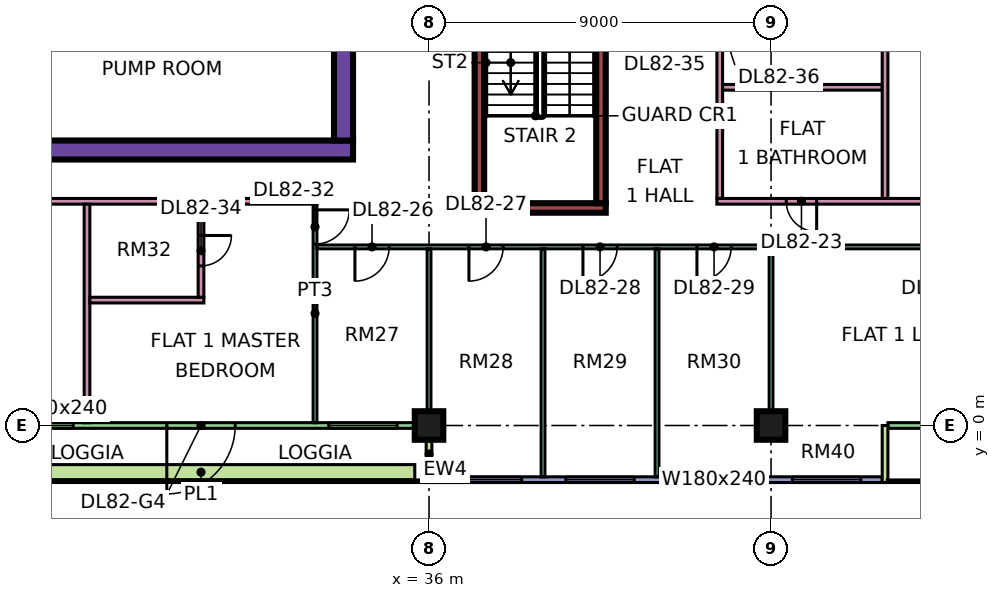
"""IFC4 building model, lengths in metres.
Left out: names, types, materials, properties, quantities, classifications, styles, units other than length and angle.
Written with IfcOpenShell. Run it as: python <this file> out.ifc"""

import sys

from ifc_helpers import new_model, si_unit, direction, frame, frame_2d, origin, origin_2d, place, context, subcontext, project, spatial, rectangle, extrude, element, fill, save


model = new_model("IFC4")
c1 = context("Model", 3, precision=1e-05, world=origin(), true_north=direction((0.0, 1.0)))
c2 = subcontext(c1, "Body", "Model", "MODEL_VIEW")
j1 = project(units=[si_unit("LENGTHUNIT", "METRE"), si_unit("PLANEANGLEUNIT", "RADIAN")], contexts=[c1])
p1 = place(None, origin())
s1 = spatial("IfcSite", under=j1, at=p1, CompositionType="ELEMENT")
p2 = place(p1, origin())
s2 = spatial("IfcBuilding", under=s1, at=p2, CompositionType="ELEMENT")
p3 = place(p2, frame((0.0, 0.0, 353.9)))
s3 = spatial("IfcBuildingStorey", under=s2, at=p3, CompositionType="ELEMENT", Elevation=353.9)
for number, where, z_axis, x_axis in (
    (1, (36.0, 0.0, 0.0), (0.0, 0.0, 1.0), (1.0, 0.0, 0.0)),
    (2, (45.0, 0.0, 0.0), (0.0, 0.0, 1.0), (1.0, 0.0, 0.0)),
):
    element("IfcColumn", number, at=place(p3, frame(where, z_axis=z_axis, x_axis=x_axis)), inside=s3, PredefinedType="COLUMN", context=c2, shape_type="SweptSolid", body=[
        extrude(rectangle(XDim=0.75, YDim=0.75, at=origin_2d()), origin(), (0.0, 0.0, 1.0), 3.75),
    ])
p4 = place(p3, frame((9.0, 7.25, 0.0), z_axis=(0.0, 0.0, 1.0), x_axis=(1.0, 0.0, 0.0)))
e3 = element("IfcWall", 3, at=p4, inside=s3, PredefinedType="SHEAR", context=c2, shape_type="SweptSolid", body=[
    extrude(rectangle(XDim=25.0, YDim=0.5, at=frame_2d((12.5, 0.0))), origin(), (0.0, 0.0, 1.0), 3.75),
])
p5 = place(p3, frame((33.75, 7.5, 0.0), z_axis=(0.0, 0.0, 1.0), x_axis=(0.0, 1.0, 0.0)))
e4 = element("IfcWall", 4, at=p5, inside=s3, PredefinedType="SHEAR", context=c2, shape_type="SweptSolid", body=[
    extrude(rectangle(XDim=12.0, YDim=0.5, at=frame_2d((6.0, 0.0))), origin(), (0.0, 0.0, 1.0), 3.75),
])
p6 = place(p5, frame((5.7, 0.0, 0.0)))
e5 = element("IfcOpeningElement", 5, at=p6, cuts=e4, PredefinedType="OPENING", context=c2, shape_type="SweptSolid", body=[
    extrude(rectangle(XDim=1.8, YDim=2.4, at=frame_2d((0.9, 1.2))), frame((0.0, 0.26, 0.0), z_axis=(0.0, -1.0, 0.0), x_axis=(1.0, 0.0, 0.0)), (0.0, 0.0, 1.0), 0.52),
])
p7 = place(p3, frame((37.2, 5.725, 0.0), z_axis=(0.0, 0.0, 1.0), x_axis=(1.0, 0.0, 0.0)))
e6 = element("IfcWall", 6, at=p7, inside=s3, PredefinedType="SHEAR", context=c2, shape_type="SweptSolid", body=[
    extrude(rectangle(XDim=3.45, YDim=0.25, at=frame_2d((1.725, 0.0))), origin(), (0.0, 0.0, 1.0), 3.75),
])
for number, where, z_axis, x_axis in (
    (7, (37.325, 5.85, 0.0), (0.0, 0.0, 1.0), (0.0, 1.0, 0.0)),
    (8, (40.525, 5.85, 0.0), (0.0, 0.0, 1.0), (0.0, 1.0, 0.0)),
):
    element("IfcWall", number, at=place(p3, frame(where, z_axis=z_axis, x_axis=x_axis)), inside=s3, PredefinedType="SHEAR", context=c2, shape_type="SweptSolid", body=[
        extrude(rectangle(XDim=6.5, YDim=0.25, at=frame_2d((3.25, 0.0))), origin(), (0.0, 0.0, 1.0), 3.75),
    ])
p8 = place(p3, frame((24.075, 0.0, 0.0), z_axis=(0.0, 0.0, 1.0), x_axis=(1.0, 0.0, 0.0)))
e9 = element("IfcWall", 9, at=p8, inside=s3, PredefinedType="SOLIDWALL", context=c2, shape_type="SweptSolid", body=[
    extrude(rectangle(XDim=11.85, YDim=0.15, at=frame_2d((5.925, 0.0))), origin(), (0.0, 0.0, 1.0), 3.35),
])
p9 = place(p8, frame((0.762, 0.0, 0.45)))
e10 = element("IfcOpeningElement", 10, at=p9, cuts=e9, PredefinedType="OPENING", context=c2, shape_type="SweptSolid", body=[
    extrude(rectangle(XDim=1.8, YDim=2.4, at=frame_2d((0.9, 1.2))), frame((0.0, 0.085, 0.0), z_axis=(0.0, -1.0, 0.0), x_axis=(1.0, 0.0, 0.0)), (0.0, 0.0, 1.0), 0.17),
])
p10 = place(p8, frame((5.025, 0.0, 0.0)))
e11 = element("IfcOpeningElement", 11, at=p10, cuts=e9, PredefinedType="OPENING", context=c2, shape_type="SweptSolid", body=[
    extrude(rectangle(XDim=1.8, YDim=2.4, at=frame_2d((0.9, 1.2))), frame((0.0, 0.085, 0.0), z_axis=(0.0, -1.0, 0.0), x_axis=(1.0, 0.0, 0.0)), (0.0, 0.0, 1.0), 0.17),
])
p11 = place(p8, frame((9.288, 0.0, 0.45)))
e12 = element("IfcOpeningElement", 12, at=p11, cuts=e9, PredefinedType="OPENING", context=c2, shape_type="SweptSolid", body=[
    extrude(rectangle(XDim=1.8, YDim=2.4, at=frame_2d((0.9, 1.2))), frame((0.0, 0.085, 0.0), z_axis=(0.0, -1.0, 0.0), x_axis=(1.0, 0.0, 0.0)), (0.0, 0.0, 1.0), 0.17),
])
p12 = place(p3, frame((36.0, -1.5, 0.0), z_axis=(0.0, 0.0, 1.0), x_axis=(0.0, 1.0, 0.0)))
e13 = element("IfcWall", 13, at=p12, inside=s3, PredefinedType="SOLIDWALL", context=c2, shape_type="SweptSolid", body=[
    extrude(rectangle(XDim=1.5, YDim=0.15, at=frame_2d((0.75, 0.0))), origin(), (0.0, 0.0, 1.0), 3.35),
])
p13 = place(p3, frame((36.075, -1.425, 0.0), z_axis=(0.0, 0.0, 1.0), x_axis=(1.0, 0.0, 0.0)))
e14 = element("IfcWall", 14, at=p13, inside=s3, PredefinedType="SOLIDWALL", context=c2, shape_type="SweptSolid", body=[
    extrude(rectangle(XDim=11.85, YDim=0.15, at=frame_2d((5.925, 0.0))), origin(), (0.0, 0.0, 1.0), 3.35),
])
p14 = place(p13, frame((0.562, 0.0, 0.45)))
e15 = element("IfcOpeningElement", 15, at=p14, cuts=e14, PredefinedType="OPENING", context=c2, shape_type="SweptSolid", body=[
    extrude(rectangle(XDim=1.8, YDim=2.4, at=frame_2d((0.9, 1.2))), frame((0.0, 0.085, 0.0), z_axis=(0.0, -1.0, 0.0), x_axis=(1.0, 0.0, 0.0)), (0.0, 0.0, 1.0), 0.17),
])
p15 = place(p13, frame((3.525, 0.0, 0.45)))
e16 = element("IfcOpeningElement", 16, at=p15, cuts=e14, PredefinedType="OPENING", context=c2, shape_type="SweptSolid", body=[
    extrude(rectangle(XDim=1.8, YDim=2.4, at=frame_2d((0.9, 1.2))), frame((0.0, 0.085, 0.0), z_axis=(0.0, -1.0, 0.0), x_axis=(1.0, 0.0, 0.0)), (0.0, 0.0, 1.0), 0.17),
])
p16 = place(p13, frame((6.525, 0.0, 0.45)))
e17 = element("IfcOpeningElement", 17, at=p16, cuts=e14, PredefinedType="OPENING", context=c2, shape_type="SweptSolid", body=[
    extrude(rectangle(XDim=1.8, YDim=2.4, at=frame_2d((0.9, 1.2))), frame((0.0, 0.085, 0.0), z_axis=(0.0, -1.0, 0.0), x_axis=(1.0, 0.0, 0.0)), (0.0, 0.0, 1.0), 0.17),
])
p17 = place(p13, frame((9.488, 0.0, 0.45)))
e18 = element("IfcOpeningElement", 18, at=p17, cuts=e14, PredefinedType="OPENING", context=c2, shape_type="SweptSolid", body=[
    extrude(rectangle(XDim=1.8, YDim=2.4, at=frame_2d((0.9, 1.2))), frame((0.0, 0.085, 0.0), z_axis=(0.0, -1.0, 0.0), x_axis=(1.0, 0.0, 0.0)), (0.0, 0.0, 1.0), 0.17),
])
p18 = place(p3, frame((48.075, 0.0, 0.0), z_axis=(0.0, 0.0, 1.0), x_axis=(1.0, 0.0, 0.0)))
e19 = element("IfcWall", 19, at=p18, inside=s3, PredefinedType="SOLIDWALL", context=c2, shape_type="SweptSolid", body=[
    extrude(rectangle(XDim=4.35, YDim=0.15, at=frame_2d((2.175, 0.0))), origin(), (0.0, 0.0, 1.0), 3.35),
])
p19 = place(p18, frame((1.275, 0.0, 0.0)))
e20 = element("IfcOpeningElement", 20, at=p19, cuts=e19, PredefinedType="OPENING", context=c2, shape_type="SweptSolid", body=[
    extrude(rectangle(XDim=1.8, YDim=2.4, at=frame_2d((0.9, 1.2))), frame((0.0, 0.085, 0.0), z_axis=(0.0, -1.0, 0.0), x_axis=(1.0, 0.0, 0.0)), (0.0, 0.0, 1.0), 0.17),
])
p20 = place(p3, frame((48.0, -1.5, 0.0), z_axis=(0.0, 0.0, 1.0), x_axis=(0.0, 1.0, 0.0)))
e21 = element("IfcWall", 21, at=p20, inside=s3, PredefinedType="SOLIDWALL", context=c2, shape_type="SweptSolid", body=[
    extrude(rectangle(XDim=1.5, YDim=0.15, at=frame_2d((0.75, 0.0))), origin(), (0.0, 0.0, 1.0), 3.35),
])
p21 = place(p3, frame((24.375, -1.229, 0.0), z_axis=(0.0, 0.0, 1.0), x_axis=(1.0, 0.0, 0.0)))
e22 = element("IfcWall", 22, at=p21, inside=s3, PredefinedType="SOLIDWALL", context=c2, shape_type="SweptSolid", body=[
    extrude(rectangle(XDim=11.25, YDim=0.4, at=frame_2d((5.625, 0.0))), origin(), (0.0, 0.0, 1.0), 0.7),
])
p22 = place(p3, frame((11.95, 5.9, 0.0), z_axis=(0.0, 0.0, 1.0), x_axis=(1.0, 0.0, 0.0)))
e23 = element("IfcWall", 23, at=p22, inside=s3, PredefinedType="PARTITIONING", context=c2, shape_type="SweptSolid", body=[
    extrude(rectangle(XDim=21.1, YDim=0.15, at=frame_2d((10.55, 0.0))), origin(), (0.0, 0.0, 1.0), 3.35),
])
p23 = place(p22, frame((1.1, 0.0, 0.0)))
e24 = element("IfcOpeningElement", 24, at=p23, cuts=e23, PredefinedType="OPENING", context=c2, shape_type="SweptSolid", body=[
    extrude(rectangle(XDim=0.9, YDim=2.1, at=frame_2d((0.45, 1.05))), frame((0.0, 0.085, 0.0), z_axis=(0.0, -1.0, 0.0), x_axis=(1.0, 0.0, 0.0)), (0.0, 0.0, 1.0), 0.17),
])
p24 = place(p22, frame((4.1, 0.0, 0.0)))
e25 = element("IfcOpeningElement", 25, at=p24, cuts=e23, PredefinedType="OPENING", context=c2, shape_type="SweptSolid", body=[
    extrude(rectangle(XDim=0.9, YDim=2.1, at=frame_2d((0.45, 1.05))), frame((0.0, 0.085, 0.0), z_axis=(0.0, -1.0, 0.0), x_axis=(1.0, 0.0, 0.0)), (0.0, 0.0, 1.0), 0.17),
])
p25 = place(p22, frame((10.1, 0.0, 0.0)))
e26 = element("IfcOpeningElement", 26, at=p25, cuts=e23, PredefinedType="OPENING", context=c2, shape_type="SweptSolid", body=[
    extrude(rectangle(XDim=0.9, YDim=2.1, at=frame_2d((0.45, 1.05))), frame((0.0, 0.085, 0.0), z_axis=(0.0, -1.0, 0.0), x_axis=(1.0, 0.0, 0.0)), (0.0, 0.0, 1.0), 0.17),
])
p26 = place(p3, frame((27.0, 0.074, 0.0), z_axis=(0.0, 0.0, 1.0), x_axis=(0.0, 1.0, 0.0)))
e27 = element("IfcWall", 27, at=p26, inside=s3, PredefinedType="PARTITIONING", context=c2, shape_type="SweptSolid", body=[
    extrude(rectangle(XDim=5.751, YDim=0.15, at=frame_2d((2.875, 0.0))), origin(), (0.0, 0.0, 1.0), 3.35),
])
p27 = place(p3, frame((27.075, 3.3, 0.0), z_axis=(0.0, 0.0, 1.0), x_axis=(1.0, 0.0, 0.0)))
e28 = element("IfcWall", 28, at=p27, inside=s3, PredefinedType="PARTITIONING", context=c2, shape_type="SweptSolid", body=[
    extrude(rectangle(XDim=3.0, YDim=0.15, at=frame_2d((1.5, 0.0))), origin(), (0.0, 0.0, 1.0), 3.35),
])
p28 = place(p3, frame((30.0, 3.375, 0.0), z_axis=(0.0, 0.0, 1.0), x_axis=(0.0, 1.0, 0.0)))
e29 = element("IfcWall", 29, at=p28, inside=s3, PredefinedType="PARTITIONING", context=c2, shape_type="SweptSolid", body=[
    extrude(rectangle(XDim=2.45, YDim=0.15, at=frame_2d((1.225, 0.0))), origin(), (0.0, 0.0, 1.0), 3.35),
])
p29 = place(p28, frame((0.825, 0.0, 0.0)))
e30 = element("IfcOpeningElement", 30, at=p29, cuts=e29, PredefinedType="OPENING", context=c2, shape_type="SweptSolid", body=[
    extrude(rectangle(XDim=0.8, YDim=2.1, at=frame_2d((0.4, 1.05))), frame((0.0, 0.085, 0.0), z_axis=(0.0, -1.0, 0.0), x_axis=(1.0, 0.0, 0.0)), (0.0, 0.0, 1.0), 0.17),
])
p30 = place(p3, frame((33.0, 0.074, 0.0), z_axis=(0.0, 0.0, 1.0), x_axis=(0.0, 1.0, 0.0)))
e31 = element("IfcWall", 31, at=p30, inside=s3, PredefinedType="PARTITIONING", context=c2, shape_type="SweptSolid", body=[
    extrude(rectangle(XDim=5.751, YDim=0.1, at=frame_2d((2.875, 0.0))), origin(), (0.0, 0.0, 1.0), 3.35),
])
p31 = place(p30, frame((4.701, 0.0, 0.0)))
e32 = element("IfcOpeningElement", 32, at=p31, cuts=e31, PredefinedType="OPENING", context=c2, shape_type="SweptSolid", body=[
    extrude(rectangle(XDim=0.9, YDim=2.1, at=frame_2d((0.45, 1.05))), frame((0.0, 0.06, 0.0), z_axis=(0.0, -1.0, 0.0), x_axis=(1.0, 0.0, 0.0)), (0.0, 0.0, 1.0), 0.12),
])
p32 = place(p3, frame((33.05, 4.7, 0.0), z_axis=(0.0, 0.0, 1.0), x_axis=(1.0, 0.0, 0.0)))
e33 = element("IfcWall", 33, at=p32, inside=s3, PredefinedType="PARTITIONING", context=c2, shape_type="SweptSolid", body=[
    extrude(rectangle(XDim=20.876, YDim=0.1, at=frame_2d((10.438, 0.0))), origin(), (0.0, 0.0, 1.0), 3.35),
])
p33 = place(p32, frame((1.0, 0.0, 0.0)))
e34 = element("IfcOpeningElement", 34, at=p33, cuts=e33, PredefinedType="OPENING", context=c2, shape_type="SweptSolid", body=[
    extrude(rectangle(XDim=0.9, YDim=2.1, at=frame_2d((0.45, 1.05))), frame((0.0, 0.06, 0.0), z_axis=(0.0, -1.0, 0.0), x_axis=(1.0, 0.0, 0.0)), (0.0, 0.0, 1.0), 0.12),
])
p34 = place(p32, frame((4.0, 0.0, 0.0)))
e35 = element("IfcOpeningElement", 35, at=p34, cuts=e33, PredefinedType="OPENING", context=c2, shape_type="SweptSolid", body=[
    extrude(rectangle(XDim=0.9, YDim=2.1, at=frame_2d((0.45, 1.05))), frame((0.0, 0.06, 0.0), z_axis=(0.0, -1.0, 0.0), x_axis=(1.0, 0.0, 0.0)), (0.0, 0.0, 1.0), 0.12),
])
p35 = place(p32, frame((7.0, 0.0, 0.0)))
e36 = element("IfcOpeningElement", 36, at=p35, cuts=e33, PredefinedType="OPENING", context=c2, shape_type="SweptSolid", body=[
    extrude(rectangle(XDim=0.9, YDim=2.1, at=frame_2d((0.45, 1.05))), frame((0.0, 0.06, 0.0), z_axis=(0.0, -1.0, 0.0), x_axis=(1.0, 0.0, 0.0)), (0.0, 0.0, 1.0), 0.12),
])
p36 = place(p32, frame((10.0, 0.0, 0.0)))
e37 = element("IfcOpeningElement", 37, at=p36, cuts=e33, PredefinedType="OPENING", context=c2, shape_type="SweptSolid", body=[
    extrude(rectangle(XDim=0.9, YDim=2.1, at=frame_2d((0.45, 1.05))), frame((0.0, 0.06, 0.0), z_axis=(0.0, -1.0, 0.0), x_axis=(1.0, 0.0, 0.0)), (0.0, 0.0, 1.0), 0.12),
])
p37 = place(p32, frame((16.0, 0.0, 0.0)))
e38 = element("IfcOpeningElement", 38, at=p37, cuts=e33, PredefinedType="OPENING", context=c2, shape_type="SweptSolid", body=[
    extrude(rectangle(XDim=0.9, YDim=2.1, at=frame_2d((0.45, 1.05))), frame((0.0, 0.06, 0.0), z_axis=(0.0, -1.0, 0.0), x_axis=(1.0, 0.0, 0.0)), (0.0, 0.0, 1.0), 0.12),
])
p38 = place(p3, frame((36.0, 0.0, 0.0), z_axis=(0.0, 0.0, 1.0), x_axis=(0.0, 1.0, 0.0)))
e39 = element("IfcWall", 39, at=p38, inside=s3, PredefinedType="PARTITIONING", context=c2, shape_type="SweptSolid", body=[
    extrude(rectangle(XDim=4.65, YDim=0.1, at=frame_2d((2.325, 0.0))), origin(), (0.0, 0.0, 1.0), 3.35),
])
for number, where, z_axis, x_axis in (
    (40, (39.0, -1.351, 0.0), (0.0, 0.0, 1.0), (0.0, 1.0, 0.0)),
    (41, (42.0, -1.351, 0.0), (0.0, 0.0, 1.0), (0.0, 1.0, 0.0)),
):
    element("IfcWall", number, at=place(p3, frame(where, z_axis=z_axis, x_axis=x_axis)), inside=s3, PredefinedType="PARTITIONING", context=c2, shape_type="SweptSolid", body=[
        extrude(rectangle(XDim=6.001, YDim=0.1, at=frame_2d((3.0, 0.0))), origin(), (0.0, 0.0, 1.0), 3.35),
    ])
p39 = place(p3, frame((43.575, 5.9, 0.0), z_axis=(0.0, 0.0, 1.0), x_axis=(1.0, 0.0, 0.0)))
e42 = element("IfcWall", 42, at=p39, inside=s3, PredefinedType="PARTITIONING", context=c2, shape_type="SweptSolid", body=[
    extrude(rectangle(XDim=10.351, YDim=0.15, at=frame_2d((5.176, 0.0))), origin(), (0.0, 0.0, 1.0), 3.35),
])
p40 = place(p39, frame((1.825, 0.0, 0.0)))
e43 = element("IfcOpeningElement", 43, at=p40, cuts=e42, PredefinedType="OPENING", context=c2, shape_type="SweptSolid", body=[
    extrude(rectangle(XDim=0.8, YDim=2.1, at=frame_2d((0.4, 1.05))), frame((0.0, 0.085, 0.0), z_axis=(0.0, -1.0, 0.0), x_axis=(1.0, 0.0, 0.0)), (0.0, 0.0, 1.0), 0.17),
])
p41 = place(p39, frame((6.975, 0.0, 0.0)))
e44 = element("IfcOpeningElement", 44, at=p41, cuts=e42, PredefinedType="OPENING", context=c2, shape_type="SweptSolid", body=[
    extrude(rectangle(XDim=0.9, YDim=2.1, at=frame_2d((0.45, 1.05))), frame((0.0, 0.085, 0.0), z_axis=(0.0, -1.0, 0.0), x_axis=(1.0, 0.0, 0.0)), (0.0, 0.0, 1.0), 0.17),
])
p42 = place(p3, frame((43.65, 5.975, 0.0), z_axis=(0.0, 0.0, 1.0), x_axis=(0.0, 1.0, 0.0)))
e45 = element("IfcWall", 45, at=p42, inside=s3, PredefinedType="PARTITIONING", context=c2, shape_type="SweptSolid", body=[
    extrude(rectangle(XDim=6.3, YDim=0.15, at=frame_2d((3.15, 0.0))), origin(), (0.0, 0.0, 1.0), 3.35),
])
p43 = place(p42, frame((4.275, 0.0, 0.0)))
e46 = element("IfcOpeningElement", 46, at=p43, cuts=e45, PredefinedType="OPENING", context=c2, shape_type="SweptSolid", body=[
    extrude(rectangle(XDim=0.9, YDim=2.1, at=frame_2d((0.45, 1.05))), frame((0.0, 0.085, 0.0), z_axis=(0.0, -1.0, 0.0), x_axis=(1.0, 0.0, 0.0)), (0.0, 0.0, 1.0), 0.17),
])
p44 = place(p3, frame((43.725, 8.9, 0.0), z_axis=(0.0, 0.0, 1.0), x_axis=(1.0, 0.0, 0.0)))
e47 = element("IfcWall", 47, at=p44, inside=s3, PredefinedType="PARTITIONING", context=c2, shape_type="SweptSolid", body=[
    extrude(rectangle(XDim=4.2, YDim=0.15, at=frame_2d((2.1, 0.0))), origin(), (0.0, 0.0, 1.0), 3.35),
])
p45 = place(p3, frame((45.0, 0.0, 0.0), z_axis=(0.0, 0.0, 1.0), x_axis=(0.0, 1.0, 0.0)))
e48 = element("IfcWall", 48, at=p45, inside=s3, PredefinedType="PARTITIONING", context=c2, shape_type="SweptSolid", body=[
    extrude(rectangle(XDim=4.65, YDim=0.1, at=frame_2d((2.325, 0.0))), origin(), (0.0, 0.0, 1.0), 3.35),
])
p46 = place(p3, frame((48.0, 5.975, 0.0), z_axis=(0.0, 0.0, 1.0), x_axis=(0.0, 1.0, 0.0)))
e49 = element("IfcWall", 49, at=p46, inside=s3, PredefinedType="PARTITIONING", context=c2, shape_type="SweptSolid", body=[
    extrude(rectangle(XDim=6.3, YDim=0.15, at=frame_2d((3.15, 0.0))), origin(), (0.0, 0.0, 1.0), 3.35),
])
p47 = place(p9, origin())
e50 = element("IfcWindow", 50, at=p47, inside=s3, PartitioningType="SINGLE_PANEL", PredefinedType="WINDOW", context=c2, shape_type="SweptSolid", body=[
    extrude(rectangle(XDim=1.8, YDim=2.4, at=frame_2d((0.9, 1.2))), frame((0.0, 0.03, 0.0), z_axis=(0.0, -1.0, 0.0), x_axis=(1.0, 0.0, 0.0)), (0.0, 0.0, 1.0), 0.06),
])
fill(e10, e50)
p48 = place(p10, frame((1.8, 0.0, 0.0), z_axis=(0.0, 0.0, 1.0), x_axis=(-1.0, 0.0, 0.0)))
e51 = element("IfcDoor", 51, at=p48, inside=s3, OperationType="DOUBLE_DOOR_SINGLE_SWING", PredefinedType="DOOR", context=c2, shape_type="SweptSolid", body=[
    extrude(rectangle(XDim=1.8, YDim=2.4, at=frame_2d((0.9, 1.2))), frame((0.0, 0.025, 0.0), z_axis=(0.0, -1.0, 0.0), x_axis=(1.0, 0.0, 0.0)), (0.0, 0.0, 1.0), 0.05),
])
fill(e11, e51)
p49 = place(p11, origin())
e52 = element("IfcWindow", 52, at=p49, inside=s3, PartitioningType="SINGLE_PANEL", PredefinedType="WINDOW", context=c2, shape_type="SweptSolid", body=[
    extrude(rectangle(XDim=1.8, YDim=2.4, at=frame_2d((0.9, 1.2))), frame((0.0, 0.03, 0.0), z_axis=(0.0, -1.0, 0.0), x_axis=(1.0, 0.0, 0.0)), (0.0, 0.0, 1.0), 0.06),
])
fill(e12, e52)
p50 = place(p14, origin())
e53 = element("IfcWindow", 53, at=p50, inside=s3, PartitioningType="SINGLE_PANEL", PredefinedType="WINDOW", context=c2, shape_type="SweptSolid", body=[
    extrude(rectangle(XDim=1.8, YDim=2.4, at=frame_2d((0.9, 1.2))), frame((0.0, 0.03, 0.0), z_axis=(0.0, -1.0, 0.0), x_axis=(1.0, 0.0, 0.0)), (0.0, 0.0, 1.0), 0.06),
])
fill(e15, e53)
p51 = place(p15, origin())
e54 = element("IfcWindow", 54, at=p51, inside=s3, PartitioningType="SINGLE_PANEL", PredefinedType="WINDOW", context=c2, shape_type="SweptSolid", body=[
    extrude(rectangle(XDim=1.8, YDim=2.4, at=frame_2d((0.9, 1.2))), frame((0.0, 0.03, 0.0), z_axis=(0.0, -1.0, 0.0), x_axis=(1.0, 0.0, 0.0)), (0.0, 0.0, 1.0), 0.06),
])
fill(e16, e54)
p52 = place(p16, origin())
e55 = element("IfcWindow", 55, at=p52, inside=s3, PartitioningType="SINGLE_PANEL", PredefinedType="WINDOW", context=c2, shape_type="SweptSolid", body=[
    extrude(rectangle(XDim=1.8, YDim=2.4, at=frame_2d((0.9, 1.2))), frame((0.0, 0.03, 0.0), z_axis=(0.0, -1.0, 0.0), x_axis=(1.0, 0.0, 0.0)), (0.0, 0.0, 1.0), 0.06),
])
fill(e17, e55)
p53 = place(p17, origin())
e56 = element("IfcWindow", 56, at=p53, inside=s3, PartitioningType="SINGLE_PANEL", PredefinedType="WINDOW", context=c2, shape_type="SweptSolid", body=[
    extrude(rectangle(XDim=1.8, YDim=2.4, at=frame_2d((0.9, 1.2))), frame((0.0, 0.03, 0.0), z_axis=(0.0, -1.0, 0.0), x_axis=(1.0, 0.0, 0.0)), (0.0, 0.0, 1.0), 0.06),
])
fill(e18, e56)
p54 = place(p40, origin())
e57 = element("IfcDoor", 57, at=p54, inside=s3, OperationType="SINGLE_SWING_RIGHT", PredefinedType="DOOR", context=c2, shape_type="SweptSolid", body=[
    extrude(rectangle(XDim=0.8, YDim=2.1, at=frame_2d((0.4, 1.05))), frame((0.0, 0.025, 0.0), z_axis=(0.0, -1.0, 0.0), x_axis=(1.0, 0.0, 0.0)), (0.0, 0.0, 1.0), 0.05),
])
fill(e43, e57)
p55 = place(p33, frame((0.9, 0.0, 0.0), z_axis=(0.0, 0.0, 1.0), x_axis=(-1.0, 0.0, 0.0)))
e58 = element("IfcDoor", 58, at=p55, inside=s3, OperationType="SINGLE_SWING_LEFT", PredefinedType="DOOR", context=c2, shape_type="SweptSolid", body=[
    extrude(rectangle(XDim=0.9, YDim=2.1, at=frame_2d((0.45, 1.05))), frame((0.0, 0.025, 0.0), z_axis=(0.0, -1.0, 0.0), x_axis=(1.0, 0.0, 0.0)), (0.0, 0.0, 1.0), 0.05),
])
fill(e34, e58)
p56 = place(p34, frame((0.9, 0.0, 0.0), z_axis=(0.0, 0.0, 1.0), x_axis=(-1.0, 0.0, 0.0)))
e59 = element("IfcDoor", 59, at=p56, inside=s3, OperationType="SINGLE_SWING_LEFT", PredefinedType="DOOR", context=c2, shape_type="SweptSolid", body=[
    extrude(rectangle(XDim=0.9, YDim=2.1, at=frame_2d((0.45, 1.05))), frame((0.0, 0.025, 0.0), z_axis=(0.0, -1.0, 0.0), x_axis=(1.0, 0.0, 0.0)), (0.0, 0.0, 1.0), 0.05),
])
fill(e35, e59)
p57 = place(p35, frame((0.9, 0.0, 0.0), z_axis=(0.0, 0.0, 1.0), x_axis=(-1.0, 0.0, 0.0)))
e60 = element("IfcDoor", 60, at=p57, inside=s3, OperationType="SINGLE_SWING_LEFT", PredefinedType="DOOR", context=c2, shape_type="SweptSolid", body=[
    extrude(rectangle(XDim=0.9, YDim=2.1, at=frame_2d((0.45, 1.05))), frame((0.0, 0.025, 0.0), z_axis=(0.0, -1.0, 0.0), x_axis=(1.0, 0.0, 0.0)), (0.0, 0.0, 1.0), 0.05),
])
fill(e36, e60)
p58 = place(p36, frame((0.9, 0.0, 0.0), z_axis=(0.0, 0.0, 1.0), x_axis=(-1.0, 0.0, 0.0)))
e61 = element("IfcDoor", 61, at=p58, inside=s3, OperationType="SINGLE_SWING_LEFT", PredefinedType="DOOR", context=c2, shape_type="SweptSolid", body=[
    extrude(rectangle(XDim=0.9, YDim=2.1, at=frame_2d((0.45, 1.05))), frame((0.0, 0.025, 0.0), z_axis=(0.0, -1.0, 0.0), x_axis=(1.0, 0.0, 0.0)), (0.0, 0.0, 1.0), 0.05),
])
fill(e37, e61)
p59 = place(p31, origin())
e62 = element("IfcDoor", 62, at=p59, inside=s3, OperationType="SINGLE_SWING_RIGHT", PredefinedType="DOOR", context=c2, shape_type="SweptSolid", body=[
    extrude(rectangle(XDim=0.9, YDim=2.1, at=frame_2d((0.45, 1.05))), frame((0.0, 0.025, 0.0), z_axis=(0.0, -1.0, 0.0), x_axis=(1.0, 0.0, 0.0)), (0.0, 0.0, 1.0), 0.05),
])
fill(e32, e62)
p60 = place(p29, origin())
e63 = element("IfcDoor", 63, at=p60, inside=s3, OperationType="SINGLE_SWING_RIGHT", PredefinedType="DOOR", context=c2, shape_type="SweptSolid", body=[
    extrude(rectangle(XDim=0.8, YDim=2.1, at=frame_2d((0.4, 1.05))), frame((0.0, 0.025, 0.0), z_axis=(0.0, -1.0, 0.0), x_axis=(1.0, 0.0, 0.0)), (0.0, 0.0, 1.0), 0.05),
])
fill(e30, e63)
save(model, sys.argv[1])
